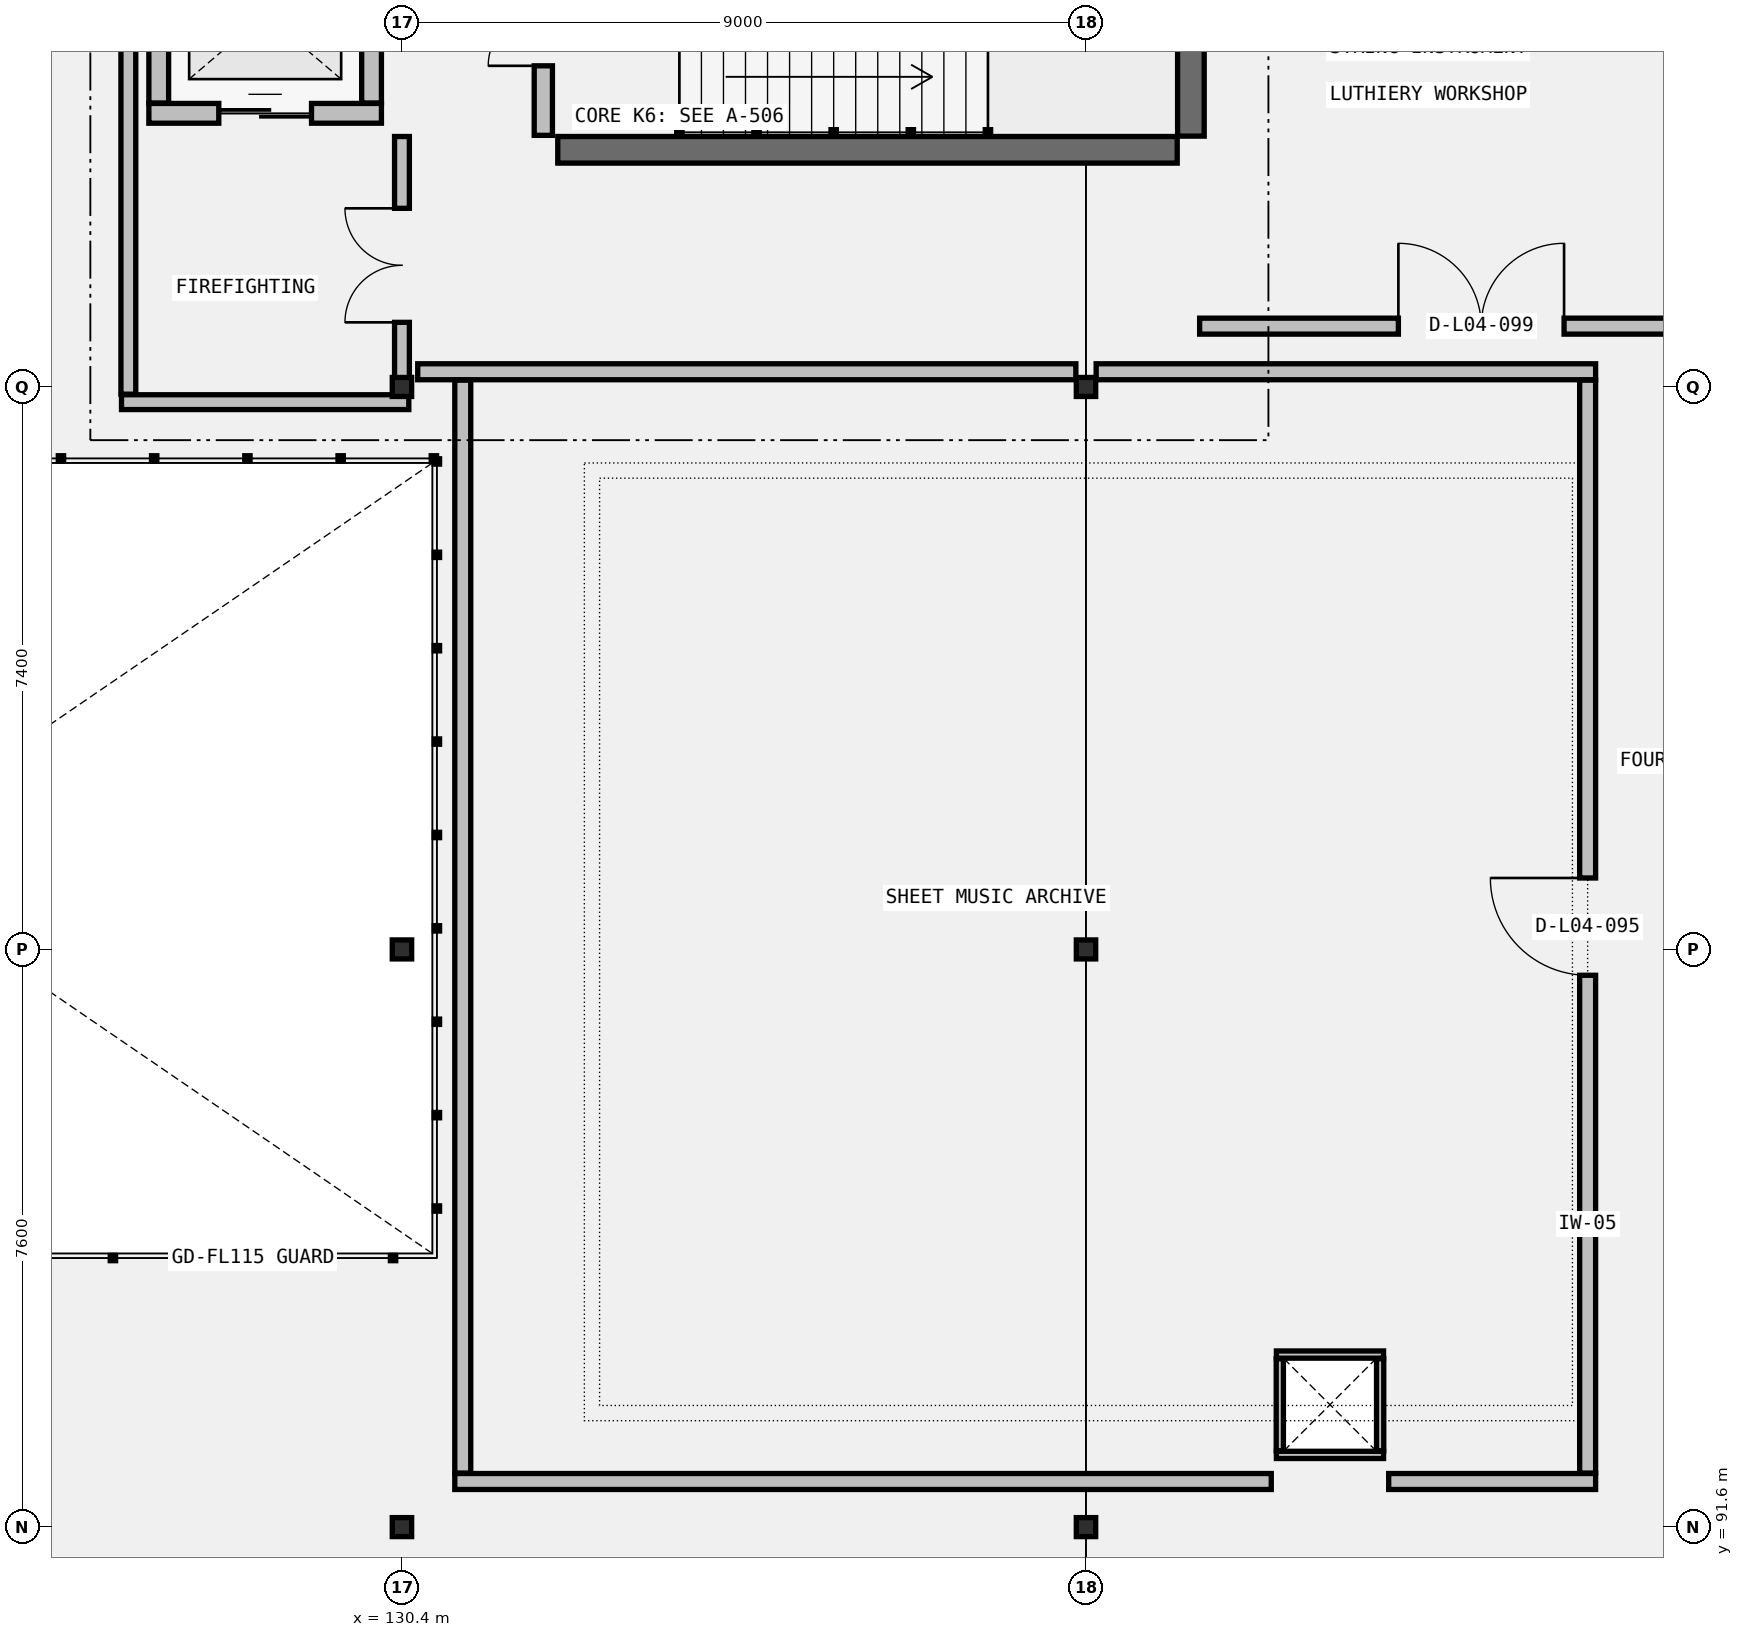
"""IFC4 building model, lengths in metres.
Left out: names, types, materials, properties, quantities, classifications, styles, units other than length and angle.
Written with IfcOpenShell. Run it as: python <this file> out.ifc"""

import sys

from ifc_helpers import new_model, si_unit, direction, frame, frame_2d, origin, origin_2d, place, context, subcontext, project, spatial, rectangle, i_section, extrude, element, fill, save


model = new_model("IFC4")
c1 = context("Model", 3, precision=1e-05, world=origin(), true_north=direction((0.0, 1.0)))
c2 = subcontext(c1, "Body", "Model", "MODEL_VIEW")
j1 = project(units=[si_unit("LENGTHUNIT", "METRE"), si_unit("PLANEANGLEUNIT", "RADIAN")], contexts=[c1])
p1 = place(None, origin())
s1 = spatial("IfcSite", under=j1, at=p1, CompositionType="ELEMENT")
p2 = place(p1, origin())
s2 = spatial("IfcBuilding", under=s1, at=p2, CompositionType="ELEMENT")
p3 = place(p2, frame((0.0, 0.0, 19.2)))
s3 = spatial("IfcBuildingStorey", under=s2, at=p3, CompositionType="ELEMENT", Elevation=19.2)
for number, where, z_axis, x_axis in (
    (1, (130.4, 91.6, 0.0), (0.0, 0.0, 1.0), (1.0, 0.0, 0.0)),
    (2, (130.4, 99.2, 0.0), (0.0, 0.0, 1.0), (1.0, 0.0, 0.0)),
    (3, (130.4, 106.6, 0.0), (0.0, 0.0, 1.0), (1.0, 0.0, 0.0)),
    (4, (139.4, 91.6, 0.0), (0.0, 0.0, 1.0), (1.0, 0.0, 0.0)),
    (5, (139.4, 99.2, 0.0), (0.0, 0.0, 1.0), (1.0, 0.0, 0.0)),
    (6, (139.4, 106.6, 0.0), (0.0, 0.0, 1.0), (1.0, 0.0, 0.0)),
):
    element("IfcColumn", number, at=place(p3, frame(where, z_axis=z_axis, x_axis=x_axis)), inside=s3, PredefinedType="COLUMN", context=c2, shape_type="SweptSolid", body=[
        extrude(i_section(OverallWidth=0.255, OverallDepth=0.25, WebThickness=0.014, FlangeThickness=0.014, FilletRadius=0.016, at=origin_2d()), origin(), (0.0, 0.0, 1.0), 4.6),
    ])
p4 = place(p3, frame((132.45, 109.72, 0.0), z_axis=(0.0, 0.0, 1.0), x_axis=(1.0, 0.0, 0.0)))
e7 = element("IfcWall", 7, at=p4, inside=s3, PredefinedType="SHEAR", context=c2, shape_type="SweptSolid", body=[
    extrude(rectangle(XDim=8.15, YDim=0.35, at=frame_2d((4.075, 0.0))), origin(), (0.0, 0.0, 1.0), 4.34),
])
p5 = place(p3, frame((140.78, 109.9, 0.0), z_axis=(0.0, 0.0, 1.0), x_axis=(0.0, 1.0, 0.0)))
e8 = element("IfcWall", 8, at=p5, inside=s3, PredefinedType="SHEAR", context=c2, shape_type="SweptSolid", body=[
    extrude(rectangle(XDim=3.3, YDim=0.35, at=frame_2d((1.65, 0.0))), origin(), (0.0, 0.0, 1.0), 4.34),
])
for number, where, z_axis, x_axis in (
    (9, (141.905, 92.55, 0.0), (0.0, 0.0, 1.0), (1.0, 0.0, 0.0)),
    (10, (141.905, 93.87, 0.0), (0.0, 0.0, 1.0), (1.0, 0.0, 0.0)),
):
    element("IfcWall", number, at=place(p3, frame(where, z_axis=z_axis, x_axis=x_axis)), inside=s3, PredefinedType="PARTITIONING", context=c2, shape_type="SweptSolid", body=[
        extrude(rectangle(XDim=1.41, YDim=0.095, at=frame_2d((0.705, 0.0))), origin(), (0.0, 0.0, 1.0), 4.34),
    ])
for number, where, z_axis, x_axis in (
    (11, (141.95, 92.605, 0.0), (0.0, 0.0, 1.0), (0.0, 1.0, 0.0)),
    (12, (143.27, 92.605, 0.0), (0.0, 0.0, 1.0), (0.0, 1.0, 0.0)),
):
    element("IfcWall", number, at=place(p3, frame(where, z_axis=z_axis, x_axis=x_axis)), inside=s3, PredefinedType="PARTITIONING", context=c2, shape_type="SweptSolid", body=[
        extrude(rectangle(XDim=1.21, YDim=0.095, at=frame_2d((0.605, 0.0))), origin(), (0.0, 0.0, 1.0), 4.34),
    ])
p6 = place(p3, frame((132.26, 109.91, 0.0), z_axis=(0.0, 0.0, 1.0), x_axis=(0.0, 1.0, 0.0)))
e13 = element("IfcWall", 13, at=p6, inside=s3, PredefinedType="STANDARD", context=c2, shape_type="SweptSolid", body=[
    extrude(rectangle(XDim=3.28, YDim=0.24, at=frame_2d((1.64, 0.0))), origin(), (0.0, 0.0, 1.0), 4.34),
])
p7 = place(p6, frame((0.915, 0.0, 0.0)))
e14 = element("IfcOpeningElement", 14, at=p7, cuts=e13, PredefinedType="OPENING", context=c2, shape_type="SweptSolid", body=[
    extrude(rectangle(XDim=1.45, YDim=2.2, at=frame_2d((0.725, 1.1))), frame((0.0, 0.13, 0.0), z_axis=(0.0, -1.0, 0.0), x_axis=(1.0, 0.0, 0.0)), (0.0, 0.0, 1.0), 0.26),
])
p8 = place(p3, frame((127.07, 110.2, 0.0), z_axis=(0.0, 0.0, 1.0), x_axis=(1.0, 0.0, 0.0)))
e15 = element("IfcWall", 15, at=p8, inside=s3, PredefinedType="STANDARD", context=c2, shape_type="SweptSolid", body=[
    extrude(rectangle(XDim=3.06, YDim=0.26, at=frame_2d((1.53, 0.0))), origin(), (0.0, 0.0, 1.0), 4.34),
])
p9 = place(p8, frame((0.92, 0.0, 0.0)))
e16 = element("IfcOpeningElement", 16, at=p9, cuts=e15, PredefinedType="OPENING", context=c2, shape_type="SweptSolid", body=[
    extrude(rectangle(XDim=1.22, YDim=2.2, at=frame_2d((0.61, 1.1))), frame((0.0, 0.14, 0.0), z_axis=(0.0, -1.0, 0.0), x_axis=(1.0, 0.0, 0.0)), (0.0, 0.0, 1.0), 0.28),
])
for number, where, z_axis, x_axis in (
    (17, (127.2, 110.336, 0.0), (0.0, 0.0, 1.0), (0.0, 1.0, 0.0)),
    (18, (130.0, 110.336, 0.0), (0.0, 0.0, 1.0), (0.0, 1.0, 0.0)),
):
    element("IfcWall", number, at=place(p3, frame(where, z_axis=z_axis, x_axis=x_axis)), inside=s3, PredefinedType="STANDARD", context=c2, shape_type="SweptSolid", body=[
        extrude(rectangle(XDim=2.328, YDim=0.26, at=frame_2d((1.164, 0.0))), origin(), (0.0, 0.0, 1.0), 4.34),
    ])
p10 = place(p3, frame((126.8, 106.505, 0.0), z_axis=(0.0, 0.0, 1.0), x_axis=(0.0, 1.0, 0.0)))
e19 = element("IfcWall", 19, at=p10, inside=s3, PredefinedType="PARTITIONING", context=c2, shape_type="SweptSolid", body=[
    extrude(rectangle(XDim=7.275, YDim=0.195, at=frame_2d((3.638, 0.0))), origin(), (0.0, 0.0, 1.0), 3.878),
])
p11 = place(p3, frame((126.71, 106.4, 0.0), z_axis=(0.0, 0.0, 1.0), x_axis=(1.0, 0.0, 0.0)))
e20 = element("IfcWall", 20, at=p11, inside=s3, PredefinedType="PARTITIONING", context=c2, shape_type="SweptSolid", body=[
    extrude(rectangle(XDim=3.78, YDim=0.195, at=frame_2d((1.89, 0.0))), origin(), (0.0, 0.0, 1.0), 3.878),
])
p12 = place(p3, frame((130.4, 106.505, 0.0), z_axis=(0.0, 0.0, 1.0), x_axis=(0.0, 1.0, 0.0)))
e21 = element("IfcWall", 21, at=p12, inside=s3, PredefinedType="PARTITIONING", context=c2, shape_type="SweptSolid", body=[
    extrude(rectangle(XDim=3.39, YDim=0.195, at=frame_2d((1.695, 0.0))), origin(), (0.0, 0.0, 1.0), 3.878),
])
p13 = place(p12, frame((0.945, 0.0, 0.0)))
e22 = element("IfcOpeningElement", 22, at=p13, cuts=e21, PredefinedType="OPENING", context=c2, shape_type="SweptSolid", body=[
    extrude(rectangle(XDim=1.5, YDim=2.2, at=frame_2d((0.75, 1.1))), frame((0.0, 0.107, 0.0), z_axis=(0.0, -1.0, 0.0), x_axis=(1.0, 0.0, 0.0)), (0.0, 0.0, 1.0), 0.215),
])
p14 = place(p3, frame((131.095, 92.2, 0.0), z_axis=(0.0, 0.0, 1.0), x_axis=(1.0, 0.0, 0.0)))
e23 = element("IfcWall", 23, at=p14, inside=s3, PredefinedType="PARTITIONING", context=c2, shape_type="SweptSolid", body=[
    extrude(rectangle(XDim=10.742, YDim=0.21, at=frame_2d((5.371, 0.0))), origin(), (0.0, 0.0, 1.0), 3.968),
])
p15 = place(p3, frame((143.383, 92.2, 0.0), z_axis=(0.0, 0.0, 1.0), x_axis=(1.0, 0.0, 0.0)))
e24 = element("IfcWall", 24, at=p15, inside=s3, PredefinedType="PARTITIONING", context=c2, shape_type="SweptSolid", body=[
    extrude(rectangle(XDim=2.722, YDim=0.21, at=frame_2d((1.361, 0.0))), origin(), (0.0, 0.0, 1.0), 3.968),
])
p16 = place(p3, frame((139.533, 106.8, 0.0), z_axis=(0.0, 0.0, 1.0), x_axis=(1.0, 0.0, 0.0)))
e25 = element("IfcWall", 25, at=p16, inside=s3, PredefinedType="PARTITIONING", context=c2, shape_type="SweptSolid", body=[
    extrude(rectangle(XDim=6.572, YDim=0.21, at=frame_2d((3.286, 0.0))), origin(), (0.0, 0.0, 1.0), 3.878),
])
p17 = place(p3, frame((130.607, 106.8, 0.0), z_axis=(0.0, 0.0, 1.0), x_axis=(1.0, 0.0, 0.0)))
e26 = element("IfcWall", 26, at=p17, inside=s3, PredefinedType="PARTITIONING", context=c2, shape_type="SweptSolid", body=[
    extrude(rectangle(XDim=8.659, YDim=0.21, at=frame_2d((4.33, 0.0))), origin(), (0.0, 0.0, 1.0), 3.878),
])
p18 = place(p3, frame((146.0, 92.311, 0.0), z_axis=(0.0, 0.0, 1.0), x_axis=(0.0, 1.0, 0.0)))
e27 = element("IfcWall", 27, at=p18, inside=s3, PredefinedType="PARTITIONING", context=c2, shape_type="SweptSolid", body=[
    extrude(rectangle(XDim=14.378, YDim=0.21, at=frame_2d((7.189, 0.0))), origin(), (0.0, 0.0, 1.0), 3.878),
])
p19 = place(p18, frame((6.549, 0.0, 0.0)))
e28 = element("IfcOpeningElement", 28, at=p19, cuts=e27, PredefinedType="OPENING", context=c2, shape_type="SweptSolid", body=[
    extrude(rectangle(XDim=1.28, YDim=2.22, at=frame_2d((0.64, 1.11))), frame((0.0, 0.115, 0.0), z_axis=(0.0, -1.0, 0.0), x_axis=(1.0, 0.0, 0.0)), (0.0, 0.0, 1.0), 0.23),
])
p20 = place(p3, frame((131.2, 92.311, 0.0), z_axis=(0.0, 0.0, 1.0), x_axis=(0.0, 1.0, 0.0)))
e29 = element("IfcWall", 29, at=p20, inside=s3, PredefinedType="PARTITIONING", context=c2, shape_type="SweptSolid", body=[
    extrude(rectangle(XDim=14.378, YDim=0.21, at=frame_2d((7.189, 0.0))), origin(), (0.0, 0.0, 1.0), 3.878),
])
p21 = place(p3, frame((140.895, 107.4, 0.0), z_axis=(0.0, 0.0, 1.0), x_axis=(1.0, 0.0, 0.0)))
e30 = element("IfcWall", 30, at=p21, inside=s3, PredefinedType="PARTITIONING", context=c2, shape_type="SweptSolid", body=[
    extrude(rectangle(XDim=7.41, YDim=0.21, at=frame_2d((3.705, 0.0))), origin(), (0.0, 0.0, 1.0), 3.968),
])
p22 = place(p21, frame((2.615, 0.0, 0.0)))
e31 = element("IfcOpeningElement", 31, at=p22, cuts=e30, PredefinedType="OPENING", context=c2, shape_type="SweptSolid", body=[
    extrude(rectangle(XDim=2.18, YDim=2.58, at=frame_2d((1.09, 1.29))), frame((0.0, 0.115, 0.0), z_axis=(0.0, -1.0, 0.0), x_axis=(1.0, 0.0, 0.0)), (0.0, 0.0, 1.0), 0.23),
])
p23 = place(p7, origin())
e32 = element("IfcDoor", 32, at=p23, inside=s3, OperationType="DOUBLE_DOOR_SINGLE_SWING", PredefinedType="DOOR", context=c2, shape_type="SweptSolid", body=[
    extrude(rectangle(XDim=1.45, YDim=2.2, at=frame_2d((0.725, 1.1))), frame((0.0, 0.025, 0.0), z_axis=(0.0, -1.0, 0.0), x_axis=(1.0, 0.0, 0.0)), (0.0, 0.0, 1.0), 0.05),
])
fill(e14, e32)
p24 = place(p9, origin())
e33 = element("IfcDoor", 33, at=p24, inside=s3, OperationType="SLIDING_TO_RIGHT", PredefinedType="DOOR", context=c2, shape_type="SweptSolid", body=[
    extrude(rectangle(XDim=1.22, YDim=2.2, at=frame_2d((0.61, 1.1))), frame((0.0, 0.025, 0.0), z_axis=(0.0, -1.0, 0.0), x_axis=(1.0, 0.0, 0.0)), (0.0, 0.0, 1.0), 0.05),
])
fill(e16, e33)
p25 = place(p13, origin())
e34 = element("IfcDoor", 34, at=p25, inside=s3, OperationType="DOUBLE_DOOR_SINGLE_SWING", PredefinedType="DOOR", context=c2, shape_type="SweptSolid", body=[
    extrude(rectangle(XDim=1.5, YDim=2.2, at=frame_2d((0.75, 1.1))), frame((0.0, 0.025, 0.0), z_axis=(0.0, -1.0, 0.0), x_axis=(1.0, 0.0, 0.0)), (0.0, 0.0, 1.0), 0.05),
])
fill(e22, e34)
p26 = place(p19, origin())
e35 = element("IfcDoor", 35, at=p26, inside=s3, OperationType="SINGLE_SWING_RIGHT", PredefinedType="DOOR", context=c2, shape_type="SweptSolid", body=[
    extrude(rectangle(XDim=1.28, YDim=2.22, at=frame_2d((0.64, 1.11))), frame((0.0, 0.025, 0.0), z_axis=(0.0, -1.0, 0.0), x_axis=(1.0, 0.0, 0.0)), (0.0, 0.0, 1.0), 0.05),
])
fill(e28, e35)
p27 = place(p22, origin())
e36 = element("IfcDoor", 36, at=p27, inside=s3, OperationType="DOUBLE_DOOR_SINGLE_SWING", PredefinedType="DOOR", context=c2, shape_type="SweptSolid", body=[
    extrude(rectangle(XDim=2.18, YDim=2.58, at=frame_2d((1.09, 1.29))), frame((0.0, 0.025, 0.0), z_axis=(0.0, -1.0, 0.0), x_axis=(1.0, 0.0, 0.0)), (0.0, 0.0, 1.0), 0.05),
])
fill(e31, e36)
save(model, sys.argv[1])
